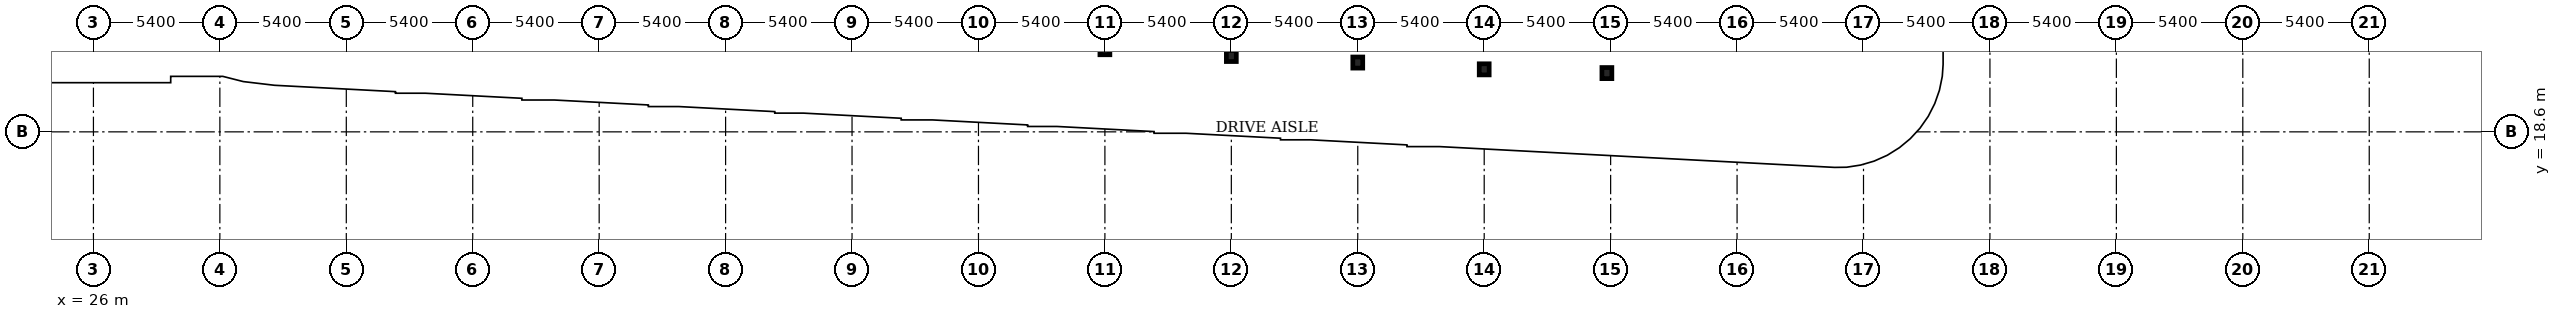
"""IFC4 building model, lengths in metres.
Left out: names, types, materials, properties, quantities, classifications, styles, units other than length and angle.
Written with IfcOpenShell. Run it as: python <this file> out.ifc"""

import sys

from ifc_helpers import new_model, si_unit, direction, frame, origin, origin_2d, place, context, subcontext, project, spatial, i_section, extrude, element, save


model = new_model("IFC4")
c1 = context("Model", 3, precision=1e-05, world=origin(), true_north=direction((0.0, 1.0)))
c2 = subcontext(c1, "Body", "Model", "MODEL_VIEW")
j1 = project(units=[si_unit("LENGTHUNIT", "METRE"), si_unit("PLANEANGLEUNIT", "RADIAN")], contexts=[c1])
p1 = place(None, origin())
s1 = spatial("IfcSite", under=j1, at=p1, CompositionType="ELEMENT")
p2 = place(p1, origin())
s2 = spatial("IfcBuilding", under=s1, at=p2, CompositionType="ELEMENT")
p3 = place(p2, frame((0.0, 0.0, -15.0)))
s3 = spatial("IfcBuildingStorey", under=s2, at=p3, CompositionType="ELEMENT", Elevation=-15.0)
for number, where, z_axis, x_axis in (
    (1, (90.64, 21.11, 0.0), (0.0, 0.0, 1.0), (1.0, 0.0, 0.0)),
    (2, (85.4, 21.27, 0.0), (0.0, 0.0, 1.0), (1.0, 0.0, 0.0)),
    (3, (80.0, 21.56, 0.0), (0.0, 0.0, 1.0), (1.0, 0.0, 0.0)),
    (4, (74.6, 21.84, 0.0), (0.0, 0.0, 1.0), (1.0, 0.0, 0.0)),
    (5, (69.2, 22.13, 0.0), (0.0, 0.0, 1.0), (1.0, 0.0, 0.0)),
):
    element("IfcColumn", number, at=place(p3, frame(where, z_axis=z_axis, x_axis=x_axis)), inside=s3, PredefinedType="COLUMN", context=c2, shape_type="SweptSolid", body=[
        extrude(i_section(OverallWidth=0.424, OverallDepth=0.474, WebThickness=0.048, FlangeThickness=0.077, FilletRadius=0.014, at=origin_2d()), origin(), (0.0, 0.0, 1.0), 5.0),
    ])
save(model, sys.argv[1])
